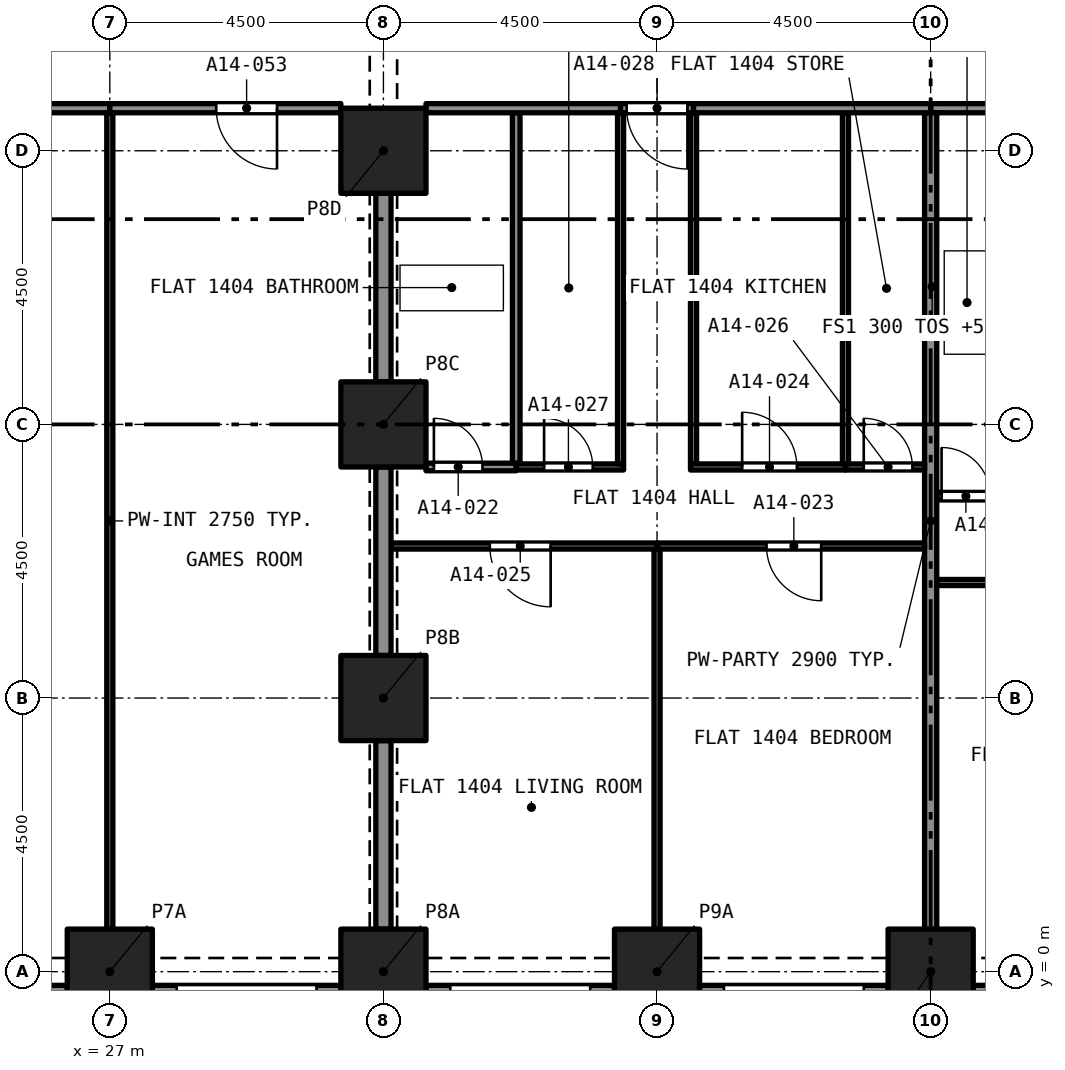
"""IFC4 building model, lengths in metres.
Left out: names, types, materials, properties, quantities, classifications, styles, units other than length and angle.
Written with IfcOpenShell. Run it as: python <this file> out.ifc"""

import sys

from ifc_helpers import new_model, si_unit, direction, frame, frame_2d, origin, origin_2d, place, context, subcontext, project, spatial, rectangle, extrude, element, fill, save


model = new_model("IFC4")
c1 = context("Model", 3, precision=1e-05, world=origin(), true_north=direction((0.0, 1.0)))
c2 = subcontext(c1, "Body", "Model", "MODEL_VIEW")
j1 = project(units=[si_unit("LENGTHUNIT", "METRE"), si_unit("PLANEANGLEUNIT", "RADIAN")], contexts=[c1])
p1 = place(None, origin())
s1 = spatial("IfcSite", under=j1, at=p1, CompositionType="ELEMENT")
p2 = place(p1, origin())
s2 = spatial("IfcBuilding", under=s1, at=p2, CompositionType="ELEMENT")
p3 = place(p2, frame((0.0, 0.0, 56.0)))
s3 = spatial("IfcBuildingStorey", under=s2, at=p3, CompositionType="ELEMENT", Elevation=56.0)
for number, where, z_axis, x_axis in (
    (1, (27.0, 0.0, 0.0), (0.0, 0.0, 1.0), (1.0, 0.0, 0.0)),
    (2, (31.5, 0.0, 0.0), (0.0, 0.0, 1.0), (1.0, 0.0, 0.0)),
    (3, (36.0, 0.0, 0.0), (0.0, 0.0, 1.0), (1.0, 0.0, 0.0)),
    (4, (40.5, 0.0, 0.0), (0.0, 0.0, 1.0), (1.0, 0.0, 0.0)),
    (5, (31.5, 4.5, 0.0), (0.0, 0.0, 1.0), (1.0, 0.0, 0.0)),
    (6, (31.5, 9.0, 0.0), (0.0, 0.0, 1.0), (1.0, 0.0, 0.0)),
    (7, (31.5, 13.5, 0.0), (0.0, 0.0, 1.0), (1.0, 0.0, 0.0)),
):
    element("IfcColumn", number, at=place(p3, frame(where, z_axis=z_axis, x_axis=x_axis)), inside=s3, PredefinedType="COLUMN", context=c2, shape_type="SweptSolid", body=[
        extrude(rectangle(XDim=1.4, YDim=1.4, at=origin_2d()), origin(), (0.0, 0.0, 1.0), 3.2),
    ])
p4 = place(p3, frame((26.3, -0.375, 0.0), z_axis=(0.0, 0.0, 1.0), x_axis=(-1.0, 0.0, 0.0)))
e8 = element("IfcWall", 8, at=p4, inside=s3, PredefinedType="SOLIDWALL", context=c2, shape_type="SweptSolid", body=[
    extrude(rectangle(XDim=3.1, YDim=0.3, at=frame_2d((1.55, 0.0))), origin(), (0.0, 0.0, 1.0), 3.2),
])
p5 = place(p4, frame((0.4, 0.0, 0.45)))
e9 = element("IfcOpeningElement", 9, at=p5, cuts=e8, PredefinedType="OPENING", context=c2, shape_type="SweptSolid", body=[
    extrude(rectangle(XDim=2.3, YDim=1.95, at=frame_2d((1.15, 0.975))), frame((0.0, 0.16, 0.0), z_axis=(0.0, -1.0, 0.0), x_axis=(1.0, 0.0, 0.0)), (0.0, 0.0, 1.0), 0.32),
])
p6 = place(p3, frame((30.8, -0.375, 0.0), z_axis=(0.0, 0.0, 1.0), x_axis=(-1.0, 0.0, 0.0)))
e10 = element("IfcWall", 10, at=p6, inside=s3, PredefinedType="SOLIDWALL", context=c2, shape_type="SweptSolid", body=[
    extrude(rectangle(XDim=3.1, YDim=0.3, at=frame_2d((1.55, 0.0))), origin(), (0.0, 0.0, 1.0), 3.2),
])
p7 = place(p6, frame((0.4, 0.0, 0.45)))
e11 = element("IfcOpeningElement", 11, at=p7, cuts=e10, PredefinedType="OPENING", context=c2, shape_type="SweptSolid", body=[
    extrude(rectangle(XDim=2.3, YDim=1.95, at=frame_2d((1.15, 0.975))), frame((0.0, 0.16, 0.0), z_axis=(0.0, -1.0, 0.0), x_axis=(1.0, 0.0, 0.0)), (0.0, 0.0, 1.0), 0.32),
])
p8 = place(p3, frame((35.3, -0.375, 0.0), z_axis=(0.0, 0.0, 1.0), x_axis=(-1.0, 0.0, 0.0)))
e12 = element("IfcWall", 12, at=p8, inside=s3, PredefinedType="SOLIDWALL", context=c2, shape_type="SweptSolid", body=[
    extrude(rectangle(XDim=3.1, YDim=0.3, at=frame_2d((1.55, 0.0))), origin(), (0.0, 0.0, 1.0), 3.2),
])
p9 = place(p8, frame((0.4, 0.0, 0.45)))
e13 = element("IfcOpeningElement", 13, at=p9, cuts=e12, PredefinedType="OPENING", context=c2, shape_type="SweptSolid", body=[
    extrude(rectangle(XDim=2.3, YDim=1.95, at=frame_2d((1.15, 0.975))), frame((0.0, 0.16, 0.0), z_axis=(0.0, -1.0, 0.0), x_axis=(1.0, 0.0, 0.0)), (0.0, 0.0, 1.0), 0.32),
])
p10 = place(p3, frame((39.8, -0.375, 0.0), z_axis=(0.0, 0.0, 1.0), x_axis=(-1.0, 0.0, 0.0)))
e14 = element("IfcWall", 14, at=p10, inside=s3, PredefinedType="SOLIDWALL", context=c2, shape_type="SweptSolid", body=[
    extrude(rectangle(XDim=3.1, YDim=0.3, at=frame_2d((1.55, 0.0))), origin(), (0.0, 0.0, 1.0), 3.2),
])
p11 = place(p10, frame((0.4, 0.0, 0.45)))
e15 = element("IfcOpeningElement", 15, at=p11, cuts=e14, PredefinedType="OPENING", context=c2, shape_type="SweptSolid", body=[
    extrude(rectangle(XDim=2.3, YDim=1.95, at=frame_2d((1.15, 0.975))), frame((0.0, 0.16, 0.0), z_axis=(0.0, -1.0, 0.0), x_axis=(1.0, 0.0, 0.0)), (0.0, 0.0, 1.0), 0.32),
])
p12 = place(p3, frame((44.3, -0.375, 0.0), z_axis=(0.0, 0.0, 1.0), x_axis=(-1.0, 0.0, 0.0)))
e16 = element("IfcWall", 16, at=p12, inside=s3, PredefinedType="SOLIDWALL", context=c2, shape_type="SweptSolid", body=[
    extrude(rectangle(XDim=3.1, YDim=0.3, at=frame_2d((1.55, 0.0))), origin(), (0.0, 0.0, 1.0), 3.2),
])
p13 = place(p12, frame((0.4, 0.0, 0.45)))
e17 = element("IfcOpeningElement", 17, at=p13, cuts=e16, PredefinedType="OPENING", context=c2, shape_type="SweptSolid", body=[
    extrude(rectangle(XDim=2.3, YDim=1.95, at=frame_2d((1.15, 0.975))), frame((0.0, 0.16, 0.0), z_axis=(0.0, -1.0, 0.0), x_axis=(1.0, 0.0, 0.0)), (0.0, 0.0, 1.0), 0.32),
])
p14 = place(p3, frame((40.6, 7.82, 0.0), z_axis=(0.0, 0.0, 1.0), x_axis=(1.0, 0.0, 0.0)))
e18 = element("IfcWall", 18, at=p14, inside=s3, PredefinedType="PARTITIONING", context=c2, shape_type="SweptSolid", body=[
    extrude(rectangle(XDim=1.059, YDim=0.125, at=frame_2d((0.53, 0.0))), origin(), (0.0, 0.0, 1.0), 2.9),
])
p15 = place(p14, frame((0.08, 0.0, 0.0)))
e19 = element("IfcOpeningElement", 19, at=p15, cuts=e18, PredefinedType="OPENING", context=c2, shape_type="SweptSolid", body=[
    extrude(rectangle(XDim=0.8, YDim=2.1, at=frame_2d((0.4, 1.05))), frame((0.0, 0.073, 0.0), z_axis=(0.0, -1.0, 0.0), x_axis=(1.0, 0.0, 0.0)), (0.0, 0.0, 1.0), 0.145),
])
p16 = place(p3, frame((40.5, 14.2, 0.0), z_axis=(0.0, 0.0, 1.0), x_axis=(1.0, 0.0, 0.0)))
e20 = element("IfcWall", 20, at=p16, inside=s3, PredefinedType="PARTITIONING", context=c2, shape_type="SweptSolid", body=[
    extrude(rectangle(XDim=2.55, YDim=0.15, at=frame_2d((1.275, 0.0))), origin(), (0.0, 0.0, 1.0), 2.9),
])
p17 = place(p3, frame((44.95, 6.4, 0.0), z_axis=(0.0, 0.0, 1.0), x_axis=(-1.0, 0.0, 0.0)))
e21 = element("IfcWall", 21, at=p17, inside=s3, PredefinedType="PARTITIONING", context=c2, shape_type="SweptSolid", body=[
    extrude(rectangle(XDim=4.35, YDim=0.1, at=frame_2d((2.175, 0.0))), origin(), (0.0, 0.0, 1.0), 2.9),
])
p18 = place(p17, frame((1.75, 0.0, 0.0)))
e22 = element("IfcOpeningElement", 22, at=p18, cuts=e21, PredefinedType="OPENING", context=c2, shape_type="SweptSolid", body=[
    extrude(rectangle(XDim=0.9, YDim=2.1, at=frame_2d((0.45, 1.05))), frame((0.0, 0.06, 0.0), z_axis=(0.0, -1.0, 0.0), x_axis=(1.0, 0.0, 0.0)), (0.0, 0.0, 1.0), 0.12),
])
p19 = place(p3, frame((40.5, 0.7, 0.0), z_axis=(0.0, 0.0, 1.0), x_axis=(0.0, 1.0, 0.0)))
e23 = element("IfcWall", 23, at=p19, inside=s3, PredefinedType="PARTITIONING", context=c2, shape_type="SweptSolid", body=[
    extrude(rectangle(XDim=13.425, YDim=0.2, at=frame_2d((6.712, 0.0))), origin(), (0.0, 0.0, 1.0), 2.9),
])
p20 = place(p3, frame((32.2, 8.3, 0.0), z_axis=(0.0, 0.0, 1.0), x_axis=(1.0, 0.0, 0.0)))
e24 = element("IfcWall", 24, at=p20, inside=s3, PredefinedType="PARTITIONING", context=c2, shape_type="SweptSolid", body=[
    extrude(rectangle(XDim=1.484, YDim=0.125, at=frame_2d((0.742, 0.0))), origin(), (0.0, 0.0, 1.0), 2.9),
])
p21 = place(p20, frame((0.13, 0.0, 0.0)))
e25 = element("IfcOpeningElement", 25, at=p21, cuts=e24, PredefinedType="OPENING", context=c2, shape_type="SweptSolid", body=[
    extrude(rectangle(XDim=0.8, YDim=2.1, at=frame_2d((0.4, 1.05))), frame((0.0, 0.073, 0.0), z_axis=(0.0, -1.0, 0.0), x_axis=(1.0, 0.0, 0.0)), (0.0, 0.0, 1.0), 0.145),
])
p22 = place(p3, frame((33.684, 8.363, 0.0), z_axis=(0.0, 0.0, 1.0), x_axis=(0.0, 1.0, 0.0)))
e26 = element("IfcWall", 26, at=p22, inside=s3, PredefinedType="PARTITIONING", context=c2, shape_type="SweptSolid", body=[
    extrude(rectangle(XDim=5.762, YDim=0.125, at=frame_2d((2.881, 0.0))), origin(), (0.0, 0.0, 1.0), 2.9),
])
p23 = place(p3, frame((31.5, 9.7, 0.0), z_axis=(0.0, 0.0, 1.0), x_axis=(0.0, 1.0, 0.0)))
e27 = element("IfcWall", 27, at=p23, inside=s3, PredefinedType="PARTITIONING", context=c2, shape_type="SweptSolid", body=[
    extrude(rectangle(XDim=3.1, YDim=0.25, at=frame_2d((1.55, 0.0))), origin(), (0.0, 0.0, 1.0), 2.38),
])
p24 = place(p3, frame((32.2, 14.2, 0.0), z_axis=(0.0, 0.0, 1.0), x_axis=(1.0, 0.0, 0.0)))
e28 = element("IfcWall", 28, at=p24, inside=s3, PredefinedType="PARTITIONING", context=c2, shape_type="SweptSolid", body=[
    extrude(rectangle(XDim=3.2, YDim=0.15, at=frame_2d((1.6, 0.0))), origin(), (0.0, 0.0, 1.0), 2.9),
])
p25 = place(p3, frame((40.4, 7.0, 0.0), z_axis=(0.0, 0.0, 1.0), x_axis=(-1.0, 0.0, 0.0)))
e29 = element("IfcWall", 29, at=p25, inside=s3, PredefinedType="PARTITIONING", context=c2, shape_type="SweptSolid", body=[
    extrude(rectangle(XDim=4.4, YDim=0.1, at=frame_2d((2.2, 0.0))), origin(), (0.0, 0.0, 1.0), 2.9),
])
p26 = place(p25, frame((1.7, 0.0, 0.0)))
e30 = element("IfcOpeningElement", 30, at=p26, cuts=e29, PredefinedType="OPENING", context=c2, shape_type="SweptSolid", body=[
    extrude(rectangle(XDim=0.9, YDim=2.1, at=frame_2d((0.45, 1.05))), frame((0.0, 0.06, 0.0), z_axis=(0.0, -1.0, 0.0), x_axis=(1.0, 0.0, 0.0)), (0.0, 0.0, 1.0), 0.12),
])
p27 = place(p3, frame((36.0, 0.7, 0.0), z_axis=(0.0, 0.0, 1.0), x_axis=(0.0, 1.0, 0.0)))
e31 = element("IfcWall", 31, at=p27, inside=s3, PredefinedType="PARTITIONING", context=c2, shape_type="SweptSolid", body=[
    extrude(rectangle(XDim=6.25, YDim=0.1, at=frame_2d((3.125, 0.0))), origin(), (0.0, 0.0, 1.0), 2.9),
])
p28 = place(p3, frame((36.6, 8.35, 0.0), z_axis=(0.0, 0.0, 1.0), x_axis=(0.0, 1.0, 0.0)))
e32 = element("IfcWall", 32, at=p28, inside=s3, PredefinedType="PARTITIONING", context=c2, shape_type="SweptSolid", body=[
    extrude(rectangle(XDim=5.775, YDim=0.1, at=frame_2d((2.887, 0.0))), origin(), (0.0, 0.0, 1.0), 2.9),
])
p29 = place(p3, frame((36.55, 8.3, 0.0), z_axis=(0.0, 0.0, 1.0), x_axis=(1.0, 0.0, 0.0)))
e33 = element("IfcWall", 33, at=p29, inside=s3, PredefinedType="PARTITIONING", context=c2, shape_type="SweptSolid", body=[
    extrude(rectangle(XDim=2.549, YDim=0.1, at=frame_2d((1.275, 0.0))), origin(), (0.0, 0.0, 1.0), 2.9),
])
p30 = place(p29, frame((0.85, 0.0, 0.0)))
e34 = element("IfcOpeningElement", 34, at=p30, cuts=e33, PredefinedType="OPENING", context=c2, shape_type="SweptSolid", body=[
    extrude(rectangle(XDim=0.9, YDim=2.1, at=frame_2d((0.45, 1.05))), frame((0.0, 0.06, 0.0), z_axis=(0.0, -1.0, 0.0), x_axis=(1.0, 0.0, 0.0)), (0.0, 0.0, 1.0), 0.12),
])
p31 = place(p3, frame((36.0, 7.0, 0.0), z_axis=(0.0, 0.0, 1.0), x_axis=(-1.0, 0.0, 0.0)))
e35 = element("IfcWall", 35, at=p31, inside=s3, PredefinedType="PARTITIONING", context=c2, shape_type="SweptSolid", body=[
    extrude(rectangle(XDim=4.375, YDim=0.1, at=frame_2d((2.188, 0.0))), origin(), (0.0, 0.0, 1.0), 2.9),
])
p32 = place(p31, frame((1.75, 0.0, 0.0)))
e36 = element("IfcOpeningElement", 36, at=p32, cuts=e35, PredefinedType="OPENING", context=c2, shape_type="SweptSolid", body=[
    extrude(rectangle(XDim=1.0, YDim=2.1, at=frame_2d((0.5, 1.05))), frame((0.0, 0.06, 0.0), z_axis=(0.0, -1.0, 0.0), x_axis=(1.0, 0.0, 0.0)), (0.0, 0.0, 1.0), 0.12),
])
p33 = place(p3, frame((39.099, 8.3, 0.0), z_axis=(0.0, 0.0, 1.0), x_axis=(1.0, 0.0, 0.0)))
e37 = element("IfcWall", 37, at=p33, inside=s3, PredefinedType="PARTITIONING", context=c2, shape_type="SweptSolid", body=[
    extrude(rectangle(XDim=1.301, YDim=0.1, at=frame_2d((0.65, 0.0))), origin(), (0.0, 0.0, 1.0), 2.9),
])
p34 = place(p33, frame((0.3, 0.0, 0.0)))
e38 = element("IfcOpeningElement", 38, at=p34, cuts=e37, PredefinedType="OPENING", context=c2, shape_type="SweptSolid", body=[
    extrude(rectangle(XDim=0.8, YDim=2.1, at=frame_2d((0.4, 1.05))), frame((0.0, 0.06, 0.0), z_axis=(0.0, -1.0, 0.0), x_axis=(1.0, 0.0, 0.0)), (0.0, 0.0, 1.0), 0.12),
])
p35 = place(p3, frame((33.684, 8.3, 0.0), z_axis=(0.0, 0.0, 1.0), x_axis=(1.0, 0.0, 0.0)))
e39 = element("IfcWall", 39, at=p35, inside=s3, PredefinedType="PARTITIONING", context=c2, shape_type="SweptSolid", body=[
    extrude(rectangle(XDim=1.766, YDim=0.1, at=frame_2d((0.883, 0.0))), origin(), (0.0, 0.0, 1.0), 2.9),
])
p36 = place(p35, frame((0.458, 0.0, 0.0)))
e40 = element("IfcOpeningElement", 40, at=p36, cuts=e39, PredefinedType="OPENING", context=c2, shape_type="SweptSolid", body=[
    extrude(rectangle(XDim=0.8, YDim=2.1, at=frame_2d((0.4, 1.05))), frame((0.0, 0.06, 0.0), z_axis=(0.0, -1.0, 0.0), x_axis=(1.0, 0.0, 0.0)), (0.0, 0.0, 1.0), 0.12),
])
p37 = place(p3, frame((35.4, 8.35, 0.0), z_axis=(0.0, 0.0, 1.0), x_axis=(0.0, 1.0, 0.0)))
e41 = element("IfcWall", 41, at=p37, inside=s3, PredefinedType="PARTITIONING", context=c2, shape_type="SweptSolid", body=[
    extrude(rectangle(XDim=5.775, YDim=0.1, at=frame_2d((2.887, 0.0))), origin(), (0.0, 0.0, 1.0), 2.9),
])
p38 = place(p3, frame((36.6, 14.2, 0.0), z_axis=(0.0, 0.0, 1.0), x_axis=(-1.0, 0.0, 0.0)))
e42 = element("IfcWall", 42, at=p38, inside=s3, PredefinedType="PARTITIONING", context=c2, shape_type="SweptSolid", body=[
    extrude(rectangle(XDim=1.2, YDim=0.15, at=frame_2d((0.6, 0.0))), origin(), (0.0, 0.0, 1.0), 2.9),
])
p39 = place(p38, frame((0.1, 0.0, 0.0)))
e43 = element("IfcOpeningElement", 43, at=p39, cuts=e42, PredefinedType="OPENING", context=c2, shape_type="SweptSolid", body=[
    extrude(rectangle(XDim=1.0, YDim=2.1, at=frame_2d((0.5, 1.05))), frame((0.0, 0.085, 0.0), z_axis=(0.0, -1.0, 0.0), x_axis=(1.0, 0.0, 0.0)), (0.0, 0.0, 1.0), 0.17),
])
p40 = place(p3, frame((39.099, 8.35, 0.0), z_axis=(0.0, 0.0, 1.0), x_axis=(0.0, 1.0, 0.0)))
e44 = element("IfcWall", 44, at=p40, inside=s3, PredefinedType="PARTITIONING", context=c2, shape_type="SweptSolid", body=[
    extrude(rectangle(XDim=5.775, YDim=0.1, at=frame_2d((2.887, 0.0))), origin(), (0.0, 0.0, 1.0), 2.9),
])
p41 = place(p3, frame((36.6, 14.2, 0.0), z_axis=(0.0, 0.0, 1.0), x_axis=(1.0, 0.0, 0.0)))
e45 = element("IfcWall", 45, at=p41, inside=s3, PredefinedType="PARTITIONING", context=c2, shape_type="SweptSolid", body=[
    extrude(rectangle(XDim=3.9, YDim=0.15, at=frame_2d((1.95, 0.0))), origin(), (0.0, 0.0, 1.0), 2.9),
])
for number, where, z_axis, x_axis in (
    (46, (31.5, 0.7, 0.0), (0.0, 0.0, 1.0), (0.0, 1.0, 0.0)),
    (47, (31.5, 5.2, 0.0), (0.0, 0.0, 1.0), (0.0, 1.0, 0.0)),
):
    element("IfcWall", number, at=place(p3, frame(where, z_axis=z_axis, x_axis=x_axis)), inside=s3, PredefinedType="PARTITIONING", context=c2, shape_type="SweptSolid", body=[
        extrude(rectangle(XDim=3.1, YDim=0.25, at=frame_2d((1.55, 0.0))), origin(), (0.0, 0.0, 1.0), 2.38),
    ])
p42 = place(p3, frame((27.0, 0.7, 0.0), z_axis=(0.0, 0.0, 1.0), x_axis=(0.0, 1.0, 0.0)))
e48 = element("IfcWall", 48, at=p42, inside=s3, PredefinedType="PARTITIONING", context=c2, shape_type="SweptSolid", body=[
    extrude(rectangle(XDim=13.425, YDim=0.1, at=frame_2d((6.712, 0.0))), origin(), (0.0, 0.0, 1.0), 2.75),
])
p43 = place(p3, frame((27.0, 14.2, 0.0), z_axis=(0.0, 0.0, 1.0), x_axis=(-1.0, 0.0, 0.0)))
e49 = element("IfcWall", 49, at=p43, inside=s3, PredefinedType="PARTITIONING", context=c2, shape_type="SweptSolid", body=[
    extrude(rectangle(XDim=8.3, YDim=0.15, at=frame_2d((4.15, 0.0))), origin(), (0.0, 0.0, 1.0), 2.75),
])
p44 = place(p43, frame((4.0, 0.0, 0.0)))
e50 = element("IfcOpeningElement", 50, at=p44, cuts=e49, PredefinedType="OPENING", context=c2, shape_type="SweptSolid", body=[
    extrude(rectangle(XDim=1.0, YDim=2.1, at=frame_2d((0.5, 1.05))), frame((0.0, 0.085, 0.0), z_axis=(0.0, -1.0, 0.0), x_axis=(1.0, 0.0, 0.0)), (0.0, 0.0, 1.0), 0.17),
])
p45 = place(p3, frame((30.8, 14.2, 0.0), z_axis=(0.0, 0.0, 1.0), x_axis=(-1.0, 0.0, 0.0)))
e51 = element("IfcWall", 51, at=p45, inside=s3, PredefinedType="PARTITIONING", context=c2, shape_type="SweptSolid", body=[
    extrude(rectangle(XDim=3.8, YDim=0.15, at=frame_2d((1.9, 0.0))), origin(), (0.0, 0.0, 1.0), 2.75),
])
p46 = place(p45, frame((1.05, 0.0, 0.0)))
e52 = element("IfcOpeningElement", 52, at=p46, cuts=e51, PredefinedType="OPENING", context=c2, shape_type="SweptSolid", body=[
    extrude(rectangle(XDim=1.0, YDim=2.1, at=frame_2d((0.5, 1.05))), frame((0.0, 0.085, 0.0), z_axis=(0.0, -1.0, 0.0), x_axis=(1.0, 0.0, 0.0)), (0.0, 0.0, 1.0), 0.17),
])
p47 = place(p15, origin())
e53 = element("IfcDoor", 53, at=p47, inside=s3, OperationType="SINGLE_SWING_LEFT", PredefinedType="DOOR", context=c2, shape_type="SweptSolid", body=[
    extrude(rectangle(XDim=0.8, YDim=2.1, at=frame_2d((0.4, 1.05))), frame((0.0, 0.025, 0.0), z_axis=(0.0, -1.0, 0.0), x_axis=(1.0, 0.0, 0.0)), (0.0, 0.0, 1.0), 0.05),
])
fill(e19, e53)
p48 = place(p21, origin())
e54 = element("IfcDoor", 54, at=p48, inside=s3, OperationType="SINGLE_SWING_LEFT", PredefinedType="DOOR", context=c2, shape_type="SweptSolid", body=[
    extrude(rectangle(XDim=0.8, YDim=2.1, at=frame_2d((0.4, 1.05))), frame((0.0, 0.025, 0.0), z_axis=(0.0, -1.0, 0.0), x_axis=(1.0, 0.0, 0.0)), (0.0, 0.0, 1.0), 0.05),
])
fill(e25, e54)
p49 = place(p26, origin())
e55 = element("IfcDoor", 55, at=p49, inside=s3, OperationType="SINGLE_SWING_LEFT", PredefinedType="DOOR", context=c2, shape_type="SweptSolid", body=[
    extrude(rectangle(XDim=0.9, YDim=2.1, at=frame_2d((0.45, 1.05))), frame((0.0, 0.025, 0.0), z_axis=(0.0, -1.0, 0.0), x_axis=(1.0, 0.0, 0.0)), (0.0, 0.0, 1.0), 0.05),
])
fill(e30, e55)
p50 = place(p30, origin())
e56 = element("IfcDoor", 56, at=p50, inside=s3, OperationType="SINGLE_SWING_RIGHT", PredefinedType="DOOR", context=c2, shape_type="SweptSolid", body=[
    extrude(rectangle(XDim=0.9, YDim=2.1, at=frame_2d((0.45, 1.05))), frame((0.0, 0.025, 0.0), z_axis=(0.0, -1.0, 0.0), x_axis=(1.0, 0.0, 0.0)), (0.0, 0.0, 1.0), 0.05),
])
fill(e34, e56)
p51 = place(p32, origin())
e57 = element("IfcDoor", 57, at=p51, inside=s3, OperationType="SINGLE_SWING_RIGHT", PredefinedType="DOOR", context=c2, shape_type="SweptSolid", body=[
    extrude(rectangle(XDim=1.0, YDim=2.1, at=frame_2d((0.5, 1.05))), frame((0.0, 0.025, 0.0), z_axis=(0.0, -1.0, 0.0), x_axis=(1.0, 0.0, 0.0)), (0.0, 0.0, 1.0), 0.05),
])
fill(e36, e57)
p52 = place(p34, origin())
e58 = element("IfcDoor", 58, at=p52, inside=s3, OperationType="SINGLE_SWING_RIGHT", PredefinedType="DOOR", context=c2, shape_type="SweptSolid", body=[
    extrude(rectangle(XDim=0.8, YDim=2.1, at=frame_2d((0.4, 1.05))), frame((0.0, 0.025, 0.0), z_axis=(0.0, -1.0, 0.0), x_axis=(1.0, 0.0, 0.0)), (0.0, 0.0, 1.0), 0.05),
])
fill(e38, e58)
p53 = place(p36, origin())
e59 = element("IfcDoor", 59, at=p53, inside=s3, OperationType="SINGLE_SWING_LEFT", PredefinedType="DOOR", context=c2, shape_type="SweptSolid", body=[
    extrude(rectangle(XDim=0.8, YDim=2.1, at=frame_2d((0.4, 1.05))), frame((0.0, 0.025, 0.0), z_axis=(0.0, -1.0, 0.0), x_axis=(1.0, 0.0, 0.0)), (0.0, 0.0, 1.0), 0.05),
])
fill(e40, e59)
p54 = place(p39, origin())
e60 = element("IfcDoor", 60, at=p54, inside=s3, OperationType="SINGLE_SWING_RIGHT", PredefinedType="DOOR", context=c2, shape_type="SweptSolid", body=[
    extrude(rectangle(XDim=1.0, YDim=2.1, at=frame_2d((0.5, 1.05))), frame((0.0, 0.025, 0.0), z_axis=(0.0, -1.0, 0.0), x_axis=(1.0, 0.0, 0.0)), (0.0, 0.0, 1.0), 0.05),
])
fill(e43, e60)
p55 = place(p46, origin())
e61 = element("IfcDoor", 61, at=p55, inside=s3, OperationType="SINGLE_SWING_LEFT", PredefinedType="DOOR", context=c2, shape_type="SweptSolid", body=[
    extrude(rectangle(XDim=1.0, YDim=2.1, at=frame_2d((0.5, 1.05))), frame((0.0, 0.025, 0.0), z_axis=(0.0, -1.0, 0.0), x_axis=(1.0, 0.0, 0.0)), (0.0, 0.0, 1.0), 0.05),
])
fill(e52, e61)
save(model, sys.argv[1])
